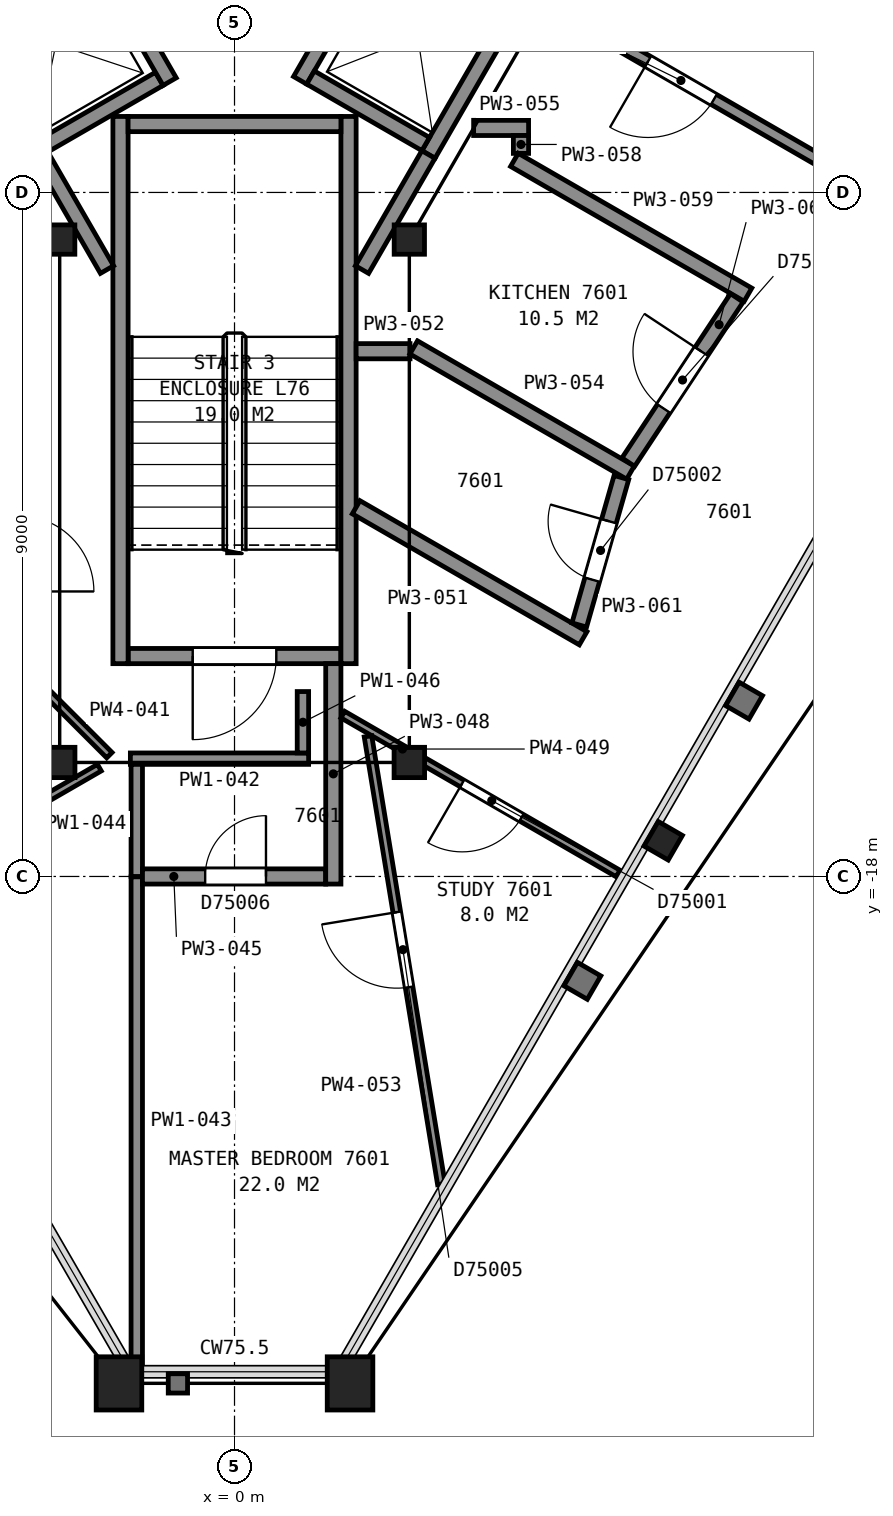
"""IFC4 building model, lengths in metres.
Left out: names, types, materials, properties, quantities, classifications, styles, units other than length and angle.
Written with IfcOpenShell. Run it as: python <this file> out.ifc"""

import sys

from ifc_helpers import new_model, si_unit, direction, frame, frame_2d, origin, origin_2d, place, context, subcontext, project, spatial, rectangle, hollow_rectangle, i_section, extrude, element, fill, save


model = new_model("IFC4")
c1 = context("Model", 3, precision=1e-05, world=origin(), true_north=direction((0.0, 1.0)))
c2 = subcontext(c1, "Body", "Model", "MODEL_VIEW")
j1 = project(units=[si_unit("LENGTHUNIT", "METRE"), si_unit("PLANEANGLEUNIT", "RADIAN")], contexts=[c1])
p1 = place(None, origin())
s1 = spatial("IfcSite", under=j1, at=p1, CompositionType="ELEMENT")
p2 = place(p1, origin())
s2 = spatial("IfcBuilding", under=s1, at=p2, CompositionType="ELEMENT")
p3 = place(p2, frame((0.0, 0.0, 301.0)))
s3 = spatial("IfcBuildingStorey", under=s2, at=p3, CompositionType="ELEMENT", Elevation=301.0)
for number, where, z_axis, x_axis in (
    (1, (-1.52, -24.67, 0.0), (0.0, 0.0, 1.0), (-1.0, 0.0, 0.0)),
    (2, (1.52, -24.67, 0.0), (0.0, 0.0, 1.0), (-1.0, 0.0, 0.0)),
):
    element("IfcColumn", number, at=place(p3, frame(where, z_axis=z_axis, x_axis=x_axis)), inside=s3, PredefinedType="COLUMN", context=c2, shape_type="SweptSolid", body=[
        extrude(hollow_rectangle(XDim=0.6, YDim=0.7, WallThickness=0.04, at=origin_2d()), origin(), (0.0, 0.0, 1.0), 3.61),
    ])
p4 = place(p3, frame((5.64, -17.53, 0.0), z_axis=(0.0, 0.0, 1.0), x_axis=(-0.5, -0.866025403784, 0.0)))
e3 = element("IfcColumn", 3, at=p4, inside=s3, PredefinedType="COLUMN", context=c2, shape_type="SweptSolid", body=[
    extrude(i_section(OverallWidth=0.373, OverallDepth=0.368, WebThickness=0.015, FlangeThickness=0.024, FilletRadius=0.015, at=origin_2d()), origin(), (0.0, 0.0, 1.0), 3.645),
])
p5 = place(p3, frame((-2.3, -9.62, 0.0), z_axis=(0.0, 0.0, 1.0), x_axis=(1.0, 0.0, 0.0)))
e4 = element("IfcColumn", 4, at=p5, inside=s3, PredefinedType="COLUMN", context=c2, shape_type="SweptSolid", body=[
    extrude(i_section(OverallWidth=0.399, OverallDepth=0.386, WebThickness=0.021, FlangeThickness=0.033, FilletRadius=0.015, at=origin_2d()), origin(), (0.0, 0.0, 1.0), 3.7),
])
for number, where, z_axis, x_axis in (
    (5, (-2.3, -16.5, 0.0), (0.0, 0.0, 1.0), (-1.0, 0.0, 0.0)),
    (6, (2.3, -16.5, 0.0), (0.0, 0.0, 1.0), (-1.0, 0.0, 0.0)),
):
    element("IfcColumn", number, at=place(p3, frame(where, z_axis=z_axis, x_axis=x_axis)), inside=s3, PredefinedType="COLUMN", context=c2, shape_type="SweptSolid", body=[
        extrude(i_section(OverallWidth=0.401, OverallDepth=0.399, WebThickness=0.025, FlangeThickness=0.04, FilletRadius=0.015, at=origin_2d()), origin(), (0.0, 0.0, 1.0), 3.7),
    ])
p6 = place(p3, frame((2.3, -9.62, 0.0), z_axis=(0.0, 0.0, 1.0), x_axis=(1.0, 0.0, 0.0)))
e7 = element("IfcColumn", 7, at=p6, inside=s3, PredefinedType="COLUMN", context=c2, shape_type="SweptSolid", body=[
    extrude(i_section(OverallWidth=0.399, OverallDepth=0.386, WebThickness=0.021, FlangeThickness=0.033, FilletRadius=0.015, at=origin_2d()), origin(), (0.0, 0.0, 1.0), 3.7),
])
p7 = place(p3, frame((-1.4, -15.1, 0.0), z_axis=(0.0, 0.0, 1.0), x_axis=(1.0, 0.0, 0.0)))
e8 = element("IfcWall", 8, at=p7, inside=s3, PredefinedType="PARTITIONING", context=c2, shape_type="SweptSolid", body=[
    extrude(rectangle(XDim=2.8, YDim=0.2, at=frame_2d((1.4, 0.0))), origin(), (0.0, 0.0, 1.0), 3.45),
])
p8 = place(p7, frame((0.85, 0.0, 0.0)))
e9 = element("IfcOpeningElement", 9, at=p8, cuts=e8, PredefinedType="OPENING", context=c2, shape_type="SweptSolid", body=[
    extrude(rectangle(XDim=1.1, YDim=2.1, at=frame_2d((0.55, 1.05))), frame((0.0, 0.11, 0.0), z_axis=(0.0, -1.0, 0.0), x_axis=(1.0, 0.0, 0.0)), (0.0, 0.0, 1.0), 0.22),
])
for number, where, z_axis, x_axis in (
    (10, (1.5, -8.0, 0.0), (0.0, 0.0, 1.0), (0.0, -1.0, 0.0)),
    (11, (-1.5, -8.0, 0.0), (0.0, 0.0, 1.0), (0.0, -1.0, 0.0)),
):
    element("IfcWall", number, at=place(p3, frame(where, z_axis=z_axis, x_axis=x_axis)), inside=s3, PredefinedType="PARTITIONING", context=c2, shape_type="SweptSolid", body=[
        extrude(rectangle(XDim=7.2, YDim=0.2, at=frame_2d((3.6, 0.0))), origin(), (0.0, 0.0, 1.0), 3.45),
    ])
p9 = place(p3, frame((-1.4, -8.1, 0.0), z_axis=(0.0, 0.0, 1.0), x_axis=(1.0, 0.0, 0.0)))
e12 = element("IfcWall", 12, at=p9, inside=s3, PredefinedType="PARTITIONING", context=c2, shape_type="SweptSolid", body=[
    extrude(rectangle(XDim=2.8, YDim=0.2, at=frame_2d((1.4, 0.0))), origin(), (0.0, 0.0, 1.0), 3.45),
])
p10 = place(p3, frame((-2.505, -8.38, 0.0), z_axis=(0.0, 0.0, 1.0), x_axis=(0.866002029911, 0.500040482552, 0.0)))
e13 = element("IfcWall", 13, at=p10, inside=s3, PredefinedType="PARTITIONING", context=c2, shape_type="SweptSolid", body=[
    extrude(rectangle(XDim=1.75, YDim=0.2, at=frame_2d((0.875, 0.0))), origin(), (0.0, 0.0, 1.0), 3.7),
])
p11 = place(p3, frame((2.552, -8.5, 0.0), z_axis=(0.0, 0.0, 1.0), x_axis=(0.499990435942, 0.866030925526, 0.0)))
e14 = element("IfcWall", 14, at=p11, inside=s3, PredefinedType="PARTITIONING", context=c2, shape_type="SweptSolid", body=[
    extrude(rectangle(XDim=2.55, YDim=0.2, at=frame_2d((1.275, 0.0))), origin(), (0.0, 0.0, 1.0), 3.7),
])
p12 = place(p3, frame((0.863, -7.525, 0.0), z_axis=(0.0, 0.0, 1.0), x_axis=(0.499990435942, 0.866030925526, 0.0)))
e15 = element("IfcWall", 15, at=p12, inside=s3, PredefinedType="PARTITIONING", context=c2, shape_type="SweptSolid", body=[
    extrude(rectangle(XDim=2.55, YDim=0.2, at=frame_2d((1.275, 0.0))), origin(), (0.0, 0.0, 1.0), 3.7),
])
p13 = place(p12, frame((0.725, 0.0, 0.0)))
e16 = element("IfcOpeningElement", 16, at=p13, cuts=e15, PredefinedType="OPENING", context=c2, shape_type="SweptSolid", body=[
    extrude(rectangle(XDim=1.1, YDim=2.1, at=frame_2d((0.55, 1.05))), frame((0.0, 0.11, 0.0), z_axis=(0.0, -1.0, 0.0), x_axis=(1.0, 0.0, 0.0)), (0.0, 0.0, 1.0), 0.22),
])
p14 = place(p3, frame((-0.853, -7.542, 0.0), z_axis=(0.0, 0.0, 1.0), x_axis=(-0.500016218704, 0.866016039709, 0.0)))
e17 = element("IfcWall", 17, at=p14, inside=s3, PredefinedType="PARTITIONING", context=c2, shape_type="SweptSolid", body=[
    extrude(rectangle(XDim=2.35, YDim=0.2, at=frame_2d((1.175, 0.0))), origin(), (0.0, 0.0, 1.0), 3.7),
])
p15 = place(p14, frame((0.625, 0.0, 0.0)))
e18 = element("IfcOpeningElement", 18, at=p15, cuts=e17, PredefinedType="OPENING", context=c2, shape_type="SweptSolid", body=[
    extrude(rectangle(XDim=1.1, YDim=2.1, at=frame_2d((0.55, 1.05))), frame((0.0, 0.11, 0.0), z_axis=(0.0, -1.0, 0.0), x_axis=(1.0, 0.0, 0.0)), (0.0, 0.0, 1.0), 0.22),
])
p16 = place(p3, frame((2.515, -8.363, 0.0), z_axis=(0.0, 0.0, 1.0), x_axis=(-0.866036909293, 0.499980071345, 0.0)))
e19 = element("IfcWall", 19, at=p16, inside=s3, PredefinedType="PARTITIONING", context=c2, shape_type="SweptSolid", body=[
    extrude(rectangle(XDim=1.75, YDim=0.2, at=frame_2d((0.875, 0.0))), origin(), (0.0, 0.0, 1.0), 3.7),
])
p17 = place(p3, frame((-2.541, -8.519, 0.0), z_axis=(0.0, 0.0, 1.0), x_axis=(0.500016142392, -0.86601608377, 0.0)))
e20 = element("IfcWall", 20, at=p17, inside=s3, PredefinedType="PARTITIONING", context=c2, shape_type="SweptSolid", body=[
    extrude(rectangle(XDim=1.727, YDim=0.2, at=frame_2d((0.864, 0.0))), origin(), (0.0, 0.0, 1.0), 3.45),
])
p18 = place(p3, frame((1.677, -10.015, 0.0), z_axis=(0.0, 0.0, 1.0), x_axis=(0.49983532306, 0.866120459187, 0.0)))
e21 = element("IfcWall", 21, at=p18, inside=s3, PredefinedType="PARTITIONING", context=c2, shape_type="SweptSolid", body=[
    extrude(rectangle(XDim=1.748, YDim=0.2, at=frame_2d((0.874, 0.0))), origin(), (0.0, 0.0, 1.0), 3.45),
])
p19 = place(p3, frame((-1.778, -16.568, 0.0), z_axis=(0.0, 0.0, 1.0), x_axis=(-0.866019606374, -0.500010041276, 0.0)))
e22 = element("IfcWall", 22, at=p19, inside=s3, PredefinedType="PARTITIONING", context=c2, shape_type="SweptSolid", body=[
    extrude(rectangle(XDim=3.527, YDim=0.1, at=frame_2d((1.764, 0.0))), origin(), (0.0, 0.0, 1.0), 2.723),
])
p20 = place(p19, frame((1.124, 0.0, 0.0)))
e23 = element("IfcOpeningElement", 23, at=p20, cuts=e22, PredefinedType="OPENING", context=c2, shape_type="SweptSolid", body=[
    extrude(rectangle(XDim=1.0, YDim=2.1, at=frame_2d((0.5, 1.05))), frame((0.0, 0.06, 0.0), z_axis=(0.0, -1.0, 0.0), x_axis=(1.0, 0.0, 0.0)), (0.0, 0.0, 1.0), 0.12),
])
p21 = place(p3, frame((-2.801, -15.25, 0.0), z_axis=(0.0, 0.0, 1.0), x_axis=(0.707181547962, -0.707032006505, 0.0)))
e24 = element("IfcWall", 24, at=p21, inside=s3, PredefinedType="PARTITIONING", context=c2, shape_type="SweptSolid", body=[
    extrude(rectangle(XDim=1.633, YDim=0.1, at=frame_2d((0.816, 0.0))), origin(), (0.0, 0.0, 1.0), 2.723),
])
p22 = place(p3, frame((-1.37, -16.45, 0.0), z_axis=(0.0, 0.0, 1.0), x_axis=(1.0, 0.0, 0.0)))
e25 = element("IfcWall", 25, at=p22, inside=s3, PredefinedType="PARTITIONING", context=c2, shape_type="SweptSolid", body=[
    extrude(rectangle(XDim=2.345, YDim=0.15, at=frame_2d((1.173, 0.0))), origin(), (0.0, 0.0, 1.0), 2.723),
])
p23 = place(p3, frame((-1.286, -24.421, 0.0), z_axis=(0.0, 0.0, 1.0), x_axis=(0.0, 1.0, 0.0)))
e26 = element("IfcWall", 26, at=p23, inside=s3, PredefinedType="PARTITIONING", context=c2, shape_type="SweptSolid", body=[
    extrude(rectangle(XDim=6.416, YDim=0.15, at=frame_2d((3.208, 0.0))), origin(), (0.0, 0.0, 1.0), 2.723),
])
p24 = place(p3, frame((-1.286, -18.0, 0.0), z_axis=(0.0, 0.0, 1.0), x_axis=(0.0, 1.0, 0.0)))
e27 = element("IfcWall", 27, at=p24, inside=s3, PredefinedType="PARTITIONING", context=c2, shape_type="SweptSolid", body=[
    extrude(rectangle(XDim=1.475, YDim=0.15, at=frame_2d((0.738, 0.0))), origin(), (0.0, 0.0, 1.0), 2.723),
])
p25 = place(p3, frame((-1.211, -18.0, 0.0), z_axis=(0.0, 0.0, 1.0), x_axis=(1.0, 0.0, 0.0)))
e28 = element("IfcWall", 28, at=p25, inside=s3, PredefinedType="PARTITIONING", context=c2, shape_type="SweptSolid", body=[
    extrude(rectangle(XDim=2.411, YDim=0.2, at=frame_2d((1.206, 0.0))), origin(), (0.0, 0.0, 1.0), 2.723),
])
p26 = place(p25, frame((0.825, 0.0, 0.0)))
e29 = element("IfcOpeningElement", 29, at=p26, cuts=e28, PredefinedType="OPENING", context=c2, shape_type="SweptSolid", body=[
    extrude(rectangle(XDim=0.8, YDim=2.1, at=frame_2d((0.4, 1.05))), frame((0.0, 0.11, 0.0), z_axis=(0.0, -1.0, 0.0), x_axis=(1.0, 0.0, 0.0)), (0.0, 0.0, 1.0), 0.22),
])
p27 = place(p3, frame((0.9, -16.375, 0.0), z_axis=(0.0, 0.0, 1.0), x_axis=(0.0, 1.0, 0.0)))
e30 = element("IfcWall", 30, at=p27, inside=s3, PredefinedType="PARTITIONING", context=c2, shape_type="SweptSolid", body=[
    extrude(rectangle(XDim=0.808, YDim=0.15, at=frame_2d((0.404, 0.0))), origin(), (0.0, 0.0, 1.0), 2.723),
])
p28 = place(p3, frame((1.3, -18.1, 0.0), z_axis=(0.0, 0.0, 1.0), x_axis=(0.0, 1.0, 0.0)))
e31 = element("IfcWall", 31, at=p28, inside=s3, PredefinedType="PARTITIONING", context=c2, shape_type="SweptSolid", body=[
    extrude(rectangle(XDim=2.9, YDim=0.2, at=frame_2d((1.45, 0.0))), origin(), (0.0, 0.0, 1.0), 2.723),
])
p29 = place(p3, frame((5.047, -17.961, 0.0), z_axis=(0.0, 0.0, 1.0), x_axis=(-0.866050460131, 0.499956598623, 0.0)))
e32 = element("IfcWall", 32, at=p29, inside=s3, PredefinedType="PARTITIONING", context=c2, shape_type="SweptSolid", body=[
    extrude(rectangle(XDim=4.182, YDim=0.1, at=frame_2d((2.091, 0.0))), origin(), (0.0, 0.0, 1.0), 2.723),
])
p30 = place(p29, frame((1.469, 0.0, 0.0)))
e33 = element("IfcOpeningElement", 33, at=p30, cuts=e32, PredefinedType="OPENING", context=c2, shape_type="SweptSolid", body=[
    extrude(rectangle(XDim=0.9, YDim=2.1, at=frame_2d((0.45, 1.05))), frame((0.0, 0.06, 0.0), z_axis=(0.0, -1.0, 0.0), x_axis=(1.0, 0.0, 0.0)), (0.0, 0.0, 1.0), 0.12),
])
p31 = place(p3, frame((1.6, -13.142, 0.0), z_axis=(0.0, 0.0, 1.0), x_axis=(0.866078307516, -0.499908356852, 0.0)))
e34 = element("IfcWall", 34, at=p31, inside=s3, PredefinedType="PARTITIONING", context=c2, shape_type="SweptSolid", body=[
    extrude(rectangle(XDim=3.448, YDim=0.2, at=frame_2d((1.724, 0.0))), origin(), (0.0, 0.0, 1.0), 2.723),
])
p32 = place(p3, frame((1.6, -11.089, 0.0), z_axis=(0.0, 0.0, 1.0), x_axis=(1.0, 0.0, 0.0)))
e35 = element("IfcWall", 35, at=p32, inside=s3, PredefinedType="PARTITIONING", context=c2, shape_type="SweptSolid", body=[
    extrude(rectangle(XDim=0.709, YDim=0.2, at=frame_2d((0.354, 0.0))), origin(), (0.0, 0.0, 1.0), 2.723),
])
p33 = place(p3, frame((2.721, -22.048, 0.0), z_axis=(0.0, 0.0, 1.0), x_axis=(-0.161659467857, 0.98684660229, 0.0)))
e36 = element("IfcWall", 36, at=p33, inside=s3, PredefinedType="PARTITIONING", context=c2, shape_type="SweptSolid", body=[
    extrude(rectangle(XDim=5.97, YDim=0.1, at=frame_2d((2.985, 0.0))), origin(), (0.0, 0.0, 1.0), 2.723),
])
p34 = place(p33, frame((2.625, 0.0, 0.0)))
e37 = element("IfcOpeningElement", 37, at=p34, cuts=e36, PredefinedType="OPENING", context=c2, shape_type="SweptSolid", body=[
    extrude(rectangle(XDim=1.0, YDim=2.1, at=frame_2d((0.5, 1.05))), frame((0.0, 0.06, 0.0), z_axis=(0.0, -1.0, 0.0), x_axis=(1.0, 0.0, 0.0)), (0.0, 0.0, 1.0), 0.12),
])
p35 = place(p3, frame((2.357, -11.039, 0.0), z_axis=(0.0, 0.0, 1.0), x_axis=(0.865999185644, -0.500045408402, 0.0)))
e38 = element("IfcWall", 38, at=p35, inside=s3, PredefinedType="PARTITIONING", context=c2, shape_type="SweptSolid", body=[
    extrude(rectangle(XDim=3.294, YDim=0.2, at=frame_2d((1.647, 0.0))), origin(), (0.0, 0.0, 1.0), 2.723),
])
p36 = place(p3, frame((3.146, -8.151, 0.0), z_axis=(0.0, 0.0, 1.0), x_axis=(1.0, 0.0, 0.0)))
e39 = element("IfcWall", 39, at=p36, inside=s3, PredefinedType="PARTITIONING", context=c2, shape_type="SweptSolid", body=[
    extrude(rectangle(XDim=0.723, YDim=0.2, at=frame_2d((0.361, 0.0))), origin(), (0.0, 0.0, 1.0), 2.723),
])
p37 = place(p3, frame((3.769, -8.486, 0.0), z_axis=(0.0, 0.0, 1.0), x_axis=(0.0, 1.0, 0.0)))
e40 = element("IfcWall", 40, at=p37, inside=s3, PredefinedType="PARTITIONING", context=c2, shape_type="SweptSolid", body=[
    extrude(rectangle(XDim=0.235, YDim=0.2, at=frame_2d((0.118, 0.0))), origin(), (0.0, 0.0, 1.0), 2.723),
])
p38 = place(p3, frame((3.682, -8.571, 0.0), z_axis=(0.0, 0.0, 1.0), x_axis=(0.866075604562, -0.499913039621, 0.0)))
e41 = element("IfcWall", 41, at=p38, inside=s3, PredefinedType="PARTITIONING", context=c2, shape_type="SweptSolid", body=[
    extrude(rectangle(XDim=3.549, YDim=0.2, at=frame_2d((1.774, 0.0))), origin(), (0.0, 0.0, 1.0), 2.723),
])
p39 = place(p3, frame((9.772, -9.777, 0.0), z_axis=(0.0, 0.0, 1.0), x_axis=(-0.866083818164, 0.499898809675, 0.0)))
e42 = element("IfcWall", 42, at=p39, inside=s3, PredefinedType="PARTITIONING", context=c2, shape_type="SweptSolid", body=[
    extrude(rectangle(XDim=6.551, YDim=0.15, at=frame_2d((3.275, 0.0))), origin(), (0.0, 0.0, 1.0), 2.723),
])
p40 = place(p39, frame((4.001, 0.0, 0.0)))
e43 = element("IfcOpeningElement", 43, at=p40, cuts=e42, PredefinedType="OPENING", context=c2, shape_type="SweptSolid", body=[
    extrude(rectangle(XDim=1.0, YDim=2.1, at=frame_2d((0.5, 1.05))), frame((0.0, 0.085, 0.0), z_axis=(0.0, -1.0, 0.0), x_axis=(1.0, 0.0, 0.0)), (0.0, 0.0, 1.0), 0.17),
])
p41 = place(p3, frame((4.536, -14.691, 0.0), z_axis=(0.0, 0.0, 1.0), x_axis=(0.27486499374, 0.961482831472, 0.0)))
e44 = element("IfcWall", 44, at=p41, inside=s3, PredefinedType="PARTITIONING", context=c2, shape_type="SweptSolid", body=[
    extrude(rectangle(XDim=2.017, YDim=0.2, at=frame_2d((1.009, 0.0))), origin(), (0.0, 0.0, 1.0), 2.723),
])
p42 = place(p41, frame((0.62, 0.0, 0.0)))
e45 = element("IfcOpeningElement", 45, at=p42, cuts=e44, PredefinedType="OPENING", context=c2, shape_type="SweptSolid", body=[
    extrude(rectangle(XDim=0.8, YDim=2.1, at=frame_2d((0.4, 1.05))), frame((0.0, 0.11, 0.0), z_axis=(0.0, -1.0, 0.0), x_axis=(1.0, 0.0, 0.0)), (0.0, 0.0, 1.0), 0.22),
])
p43 = place(p3, frame((5.181, -12.548, 0.0), z_axis=(0.0, 0.0, 1.0), x_axis=(0.55106277299, 0.834463792039, 0.0)))
e46 = element("IfcWall", 46, at=p43, inside=s3, PredefinedType="PARTITIONING", context=c2, shape_type="SweptSolid", body=[
    extrude(rectangle(XDim=2.59, YDim=0.2, at=frame_2d((1.295, 0.0))), origin(), (0.0, 0.0, 1.0), 2.723),
])
p44 = place(p43, frame((0.845, 0.0, 0.0)))
e47 = element("IfcOpeningElement", 47, at=p44, cuts=e46, PredefinedType="OPENING", context=c2, shape_type="SweptSolid", body=[
    extrude(rectangle(XDim=0.9, YDim=2.1, at=frame_2d((0.45, 1.05))), frame((0.0, 0.11, 0.0), z_axis=(0.0, -1.0, 0.0), x_axis=(1.0, 0.0, 0.0)), (0.0, 0.0, 1.0), 0.22),
])
p45 = place(p8, origin())
e48 = element("IfcDoor", 48, at=p45, inside=s3, OperationType="SINGLE_SWING_LEFT", PredefinedType="DOOR", context=c2, shape_type="SweptSolid", body=[
    extrude(rectangle(XDim=1.1, YDim=2.1, at=frame_2d((0.55, 1.05))), frame((0.0, 0.025, 0.0), z_axis=(0.0, -1.0, 0.0), x_axis=(1.0, 0.0, 0.0)), (0.0, 0.0, 1.0), 0.05),
])
fill(e9, e48)
p46 = place(p26, origin())
e49 = element("IfcDoor", 49, at=p46, inside=s3, OperationType="SINGLE_SWING_RIGHT", PredefinedType="DOOR", context=c2, shape_type="SweptSolid", body=[
    extrude(rectangle(XDim=0.8, YDim=2.1, at=frame_2d((0.4, 1.05))), frame((0.0, 0.025, 0.0), z_axis=(0.0, -1.0, 0.0), x_axis=(1.0, 0.0, 0.0)), (0.0, 0.0, 1.0), 0.05),
])
fill(e29, e49)
p47 = place(p30, origin())
e50 = element("IfcDoor", 50, at=p47, inside=s3, OperationType="SINGLE_SWING_RIGHT", PredefinedType="DOOR", context=c2, shape_type="SweptSolid", body=[
    extrude(rectangle(XDim=0.9, YDim=2.1, at=frame_2d((0.45, 1.05))), frame((0.0, 0.025, 0.0), z_axis=(0.0, -1.0, 0.0), x_axis=(1.0, 0.0, 0.0)), (0.0, 0.0, 1.0), 0.05),
])
fill(e33, e50)
p48 = place(p34, origin())
e51 = element("IfcDoor", 51, at=p48, inside=s3, OperationType="SINGLE_SWING_RIGHT", PredefinedType="DOOR", context=c2, shape_type="SweptSolid", body=[
    extrude(rectangle(XDim=1.0, YDim=2.1, at=frame_2d((0.5, 1.05))), frame((0.0, 0.025, 0.0), z_axis=(0.0, -1.0, 0.0), x_axis=(1.0, 0.0, 0.0)), (0.0, 0.0, 1.0), 0.05),
])
fill(e37, e51)
p49 = place(p40, origin())
e52 = element("IfcDoor", 52, at=p49, inside=s3, OperationType="SINGLE_SWING_RIGHT", PredefinedType="DOOR", context=c2, shape_type="SweptSolid", body=[
    extrude(rectangle(XDim=1.0, YDim=2.1, at=frame_2d((0.5, 1.05))), frame((0.0, 0.025, 0.0), z_axis=(0.0, -1.0, 0.0), x_axis=(1.0, 0.0, 0.0)), (0.0, 0.0, 1.0), 0.05),
])
fill(e43, e52)
p50 = place(p42, origin())
e53 = element("IfcDoor", 53, at=p50, inside=s3, OperationType="SINGLE_SWING_RIGHT", PredefinedType="DOOR", context=c2, shape_type="SweptSolid", body=[
    extrude(rectangle(XDim=0.8, YDim=2.1, at=frame_2d((0.4, 1.05))), frame((0.0, 0.025, 0.0), z_axis=(0.0, -1.0, 0.0), x_axis=(1.0, 0.0, 0.0)), (0.0, 0.0, 1.0), 0.05),
])
fill(e45, e53)
p51 = place(p44, origin())
e54 = element("IfcDoor", 54, at=p51, inside=s3, OperationType="SINGLE_SWING_RIGHT", PredefinedType="DOOR", context=c2, shape_type="SweptSolid", body=[
    extrude(rectangle(XDim=0.9, YDim=2.1, at=frame_2d((0.45, 1.05))), frame((0.0, 0.025, 0.0), z_axis=(0.0, -1.0, 0.0), x_axis=(1.0, 0.0, 0.0)), (0.0, 0.0, 1.0), 0.05),
])
fill(e47, e54)
save(model, sys.argv[1])
